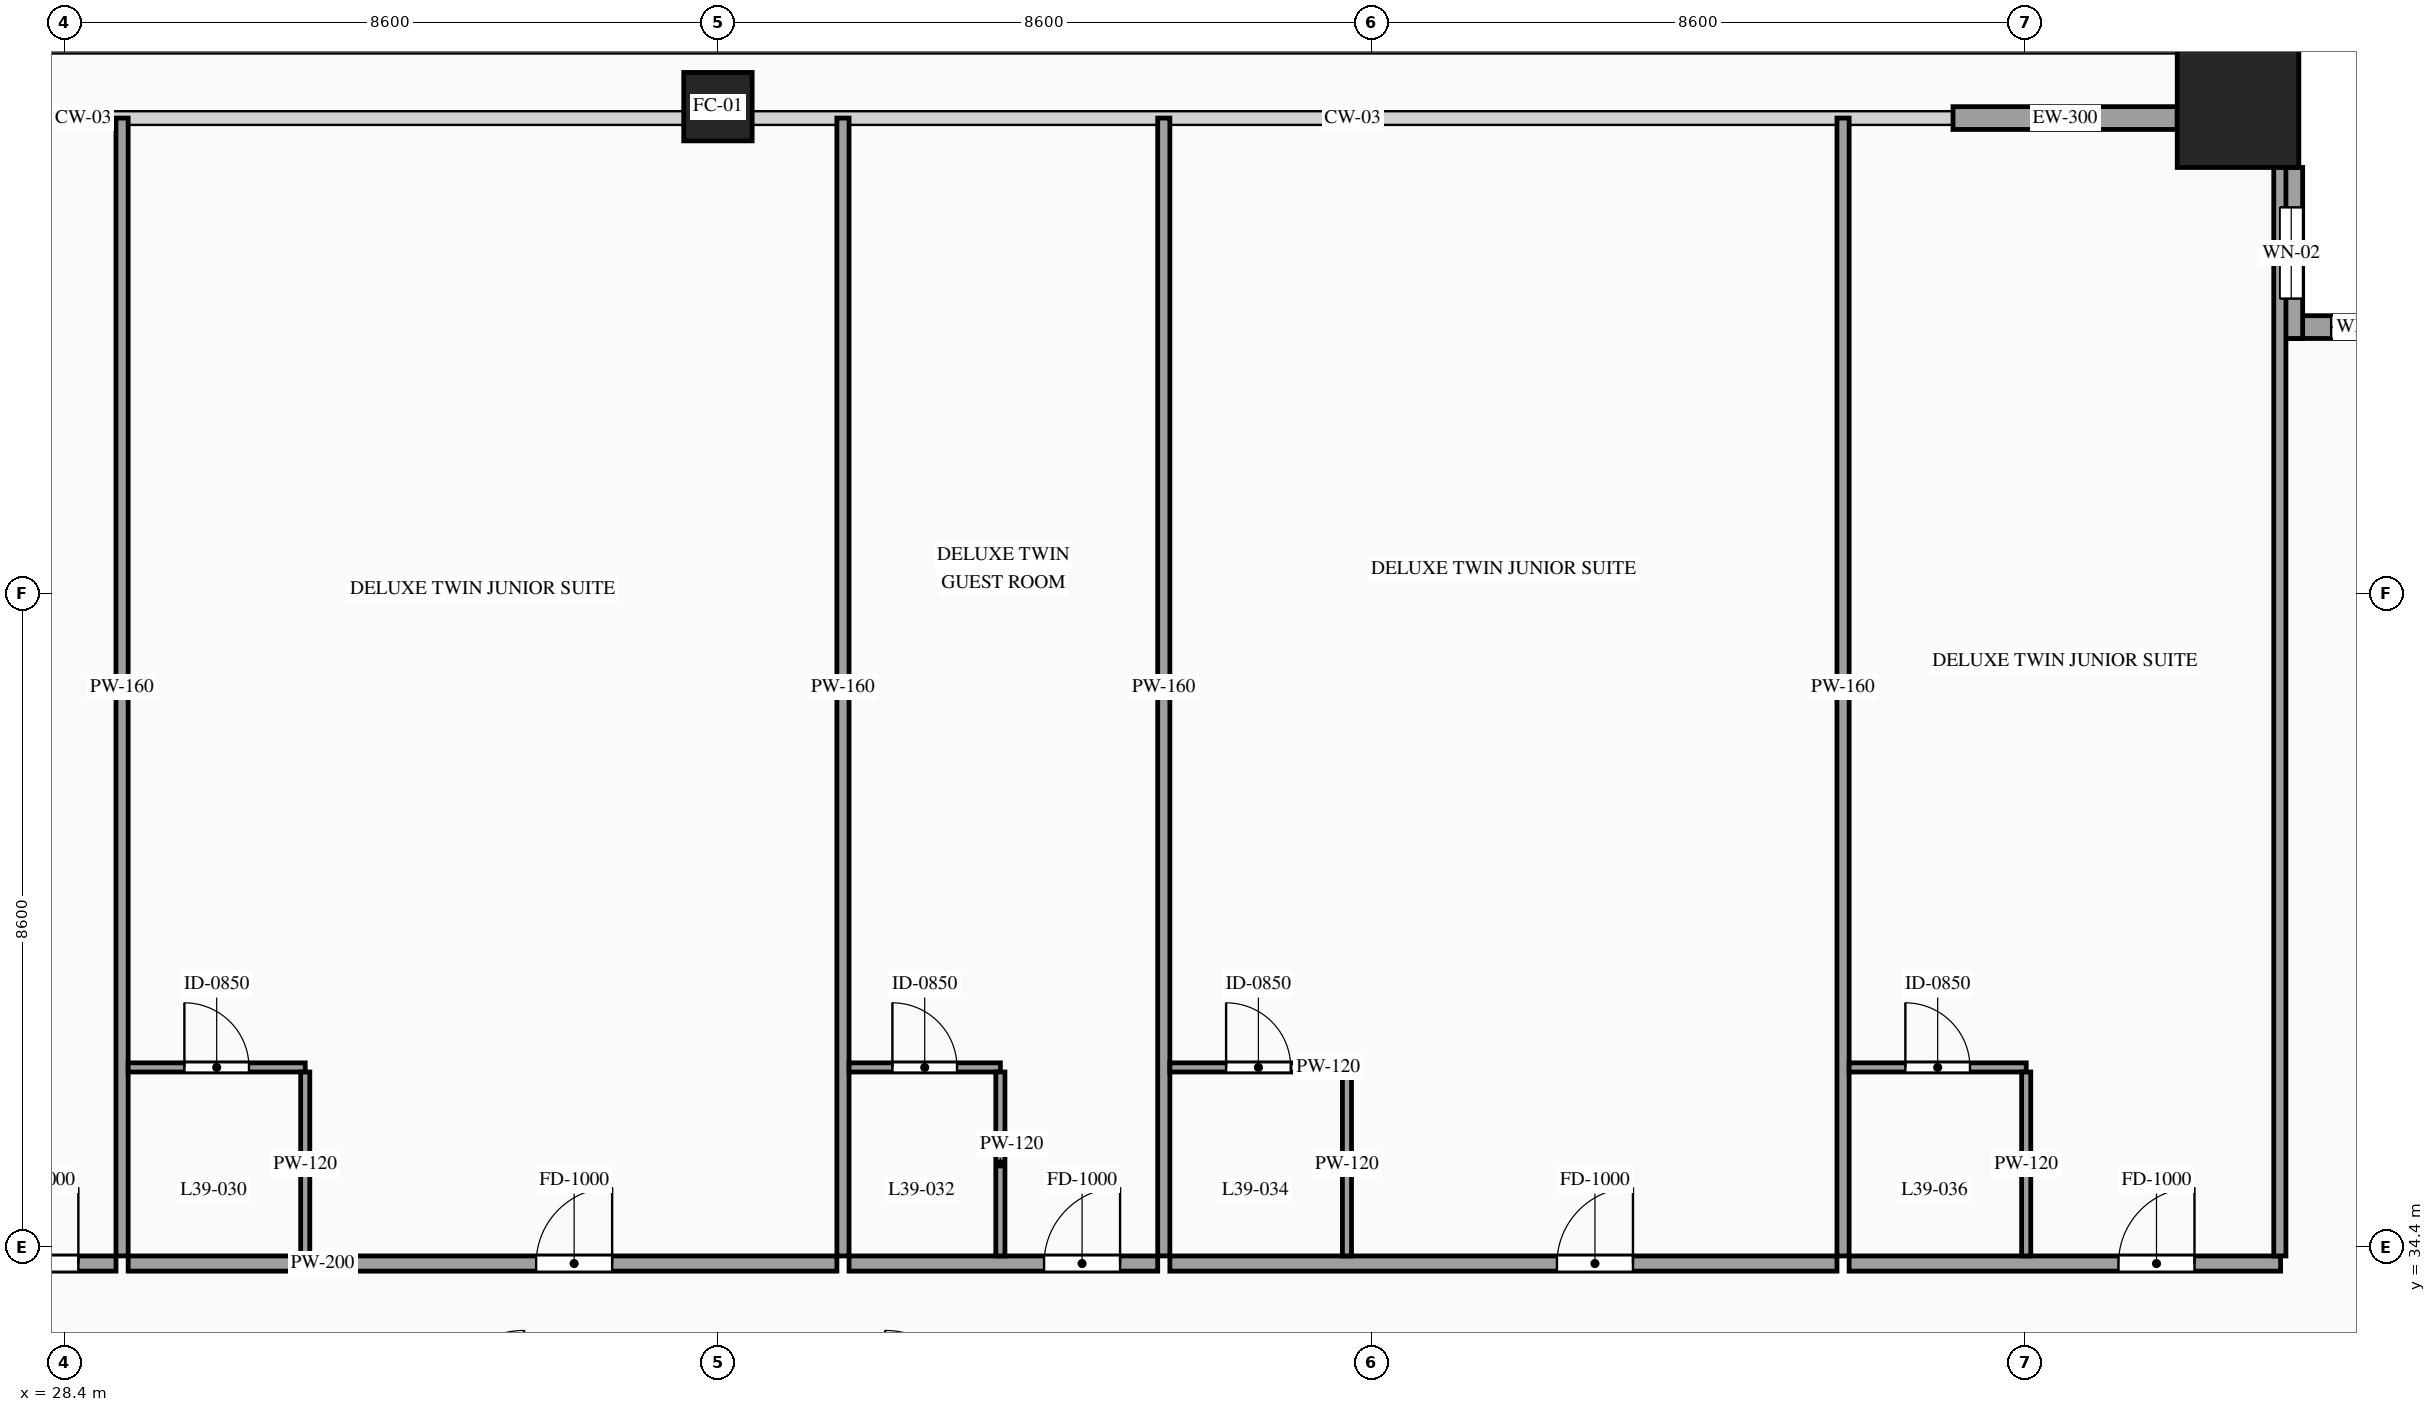
"""IFC4 building model, lengths in metres.
Left out: names, types, materials, properties, quantities, classifications, styles, units other than length and angle.
Written with IfcOpenShell. Run it as: python <this file> out.ifc"""

import sys

from ifc_helpers import new_model, si_unit, direction, frame, frame_2d, origin, origin_2d, place, context, subcontext, project, spatial, rectangle, hollow_rectangle, extrude, source, transform, mapped, element, fill, save


model = new_model("IFC4")
c1 = context("Model", 3, precision=1e-05, world=origin(), true_north=direction((0.0, 1.0)))
c2 = subcontext(c1, "Body", "Model", "MODEL_VIEW")
j1 = project(units=[si_unit("LENGTHUNIT", "METRE"), si_unit("PLANEANGLEUNIT", "RADIAN")], contexts=[c1])
p1 = place(None, origin())
s1 = spatial("IfcSite", under=j1, at=p1, CompositionType="ELEMENT")
p2 = place(p1, origin())
s2 = spatial("IfcBuilding", under=s1, at=p2, CompositionType="ELEMENT")
p3 = place(p2, frame((0.0, 0.0, 148.8)))
s3 = spatial("IfcBuildingStorey", under=s2, at=p3, CompositionType="ELEMENT", Elevation=148.8)
m1 = source(origin(), c2, "Body", "SweptSolid", [
    extrude(hollow_rectangle(XDim=0.9, YDim=0.9, WallThickness=0.042, at=origin_2d()), origin(), (0.0, 0.0, 1.0), 3.6),
])
p4 = place(p3, frame((37.0, 49.4, 0.0), z_axis=(0.0, 0.0, 1.0), x_axis=(1.0, 0.0, 0.0)))
e1 = element("IfcColumn", 1, at=p4, inside=s3, PredefinedType="COLUMN", context=c2, shape_type="MappedRepresentation", body=[
    mapped(m1, transform((0.0, 0.0, 0.0), scale=1.0)),
])
m2 = source(origin(), c2, "Body", "SweptSolid", [
    extrude(hollow_rectangle(XDim=1.6, YDim=1.6, WallThickness=0.07, at=origin_2d()), origin(), (0.0, 0.0, 1.0), 3.6),
])
p5 = place(p3, frame((57.0, 49.4, 0.0), z_axis=(0.0, 0.0, 1.0), x_axis=(1.0, 0.0, 0.0)))
e2 = element("IfcColumn", 2, at=p5, inside=s3, PredefinedType="COLUMN", context=c2, shape_type="MappedRepresentation", body=[
    mapped(m2, transform((0.0, 0.0, 0.0), scale=1.0)),
])
p6 = place(p3, frame((59.8, 46.5, 0.0), z_axis=(0.0, 0.0, 1.0), x_axis=(-1.0, 0.0, 0.0)))
e3 = element("IfcWall", 3, at=p6, inside=s3, PredefinedType="SOLIDWALL", context=c2, shape_type="SweptSolid", body=[
    extrude(rectangle(XDim=2.25, YDim=0.3, at=frame_2d((1.125, 0.0))), origin(), (0.0, 0.0, 1.0), 3.38),
])
p7 = place(p6, frame((0.675, 0.0, 0.85)))
e4 = element("IfcOpeningElement", 4, at=p7, cuts=e3, PredefinedType="OPENING", context=c2, shape_type="SweptSolid", body=[
    extrude(rectangle(XDim=0.9, YDim=1.5, at=frame_2d((0.45, 0.75))), frame((0.0, 0.165, 0.0), z_axis=(0.0, -1.0, 0.0), x_axis=(1.0, 0.0, 0.0)), (0.0, 0.0, 1.0), 0.33),
])
p8 = place(p3, frame((57.7, 46.35, 0.0), z_axis=(0.0, 0.0, 1.0), x_axis=(0.0, 1.0, 0.0)))
e5 = element("IfcWall", 5, at=p8, inside=s3, PredefinedType="SOLIDWALL", context=c2, shape_type="SweptSolid", body=[
    extrude(rectangle(XDim=2.25, YDim=0.3, at=frame_2d((1.125, 0.0))), origin(), (0.0, 0.0, 1.0), 3.38),
])
p9 = place(p8, frame((0.525, 0.0, 0.85)))
e6 = element("IfcOpeningElement", 6, at=p9, cuts=e5, PredefinedType="OPENING", context=c2, shape_type="SweptSolid", body=[
    extrude(rectangle(XDim=1.2, YDim=2.1, at=frame_2d((0.6, 1.05))), frame((0.0, 0.165, 0.0), z_axis=(0.0, -1.0, 0.0), x_axis=(1.0, 0.0, 0.0)), (0.0, 0.0, 1.0), 0.33),
])
m3 = source(origin(), c2, "Body", "SweptSolid", [
    extrude(rectangle(XDim=2.95, YDim=0.3, at=frame_2d((1.475, 0.0))), origin(), (0.0, 0.0, 1.0), 2.775),
])
p10 = place(p3, frame((53.25, 49.25, 0.0), z_axis=(0.0, 0.0, 1.0), x_axis=(1.0, 0.0, 0.0)))
e7 = element("IfcWall", 7, at=p10, inside=s3, PredefinedType="SOLIDWALL", context=c2, shape_type="MappedRepresentation", body=[
    mapped(m3, transform((0.0, 0.0, 0.0), scale=1.0)),
])
p11 = place(p3, frame((25.018, 34.18, 0.0), z_axis=(0.0, 0.0, 1.0), x_axis=(1.0, 0.0, 0.0)))
e8 = element("IfcWall", 8, at=p11, inside=s3, PredefinedType="PARTITIONING", context=c2, shape_type="SweptSolid", body=[
    extrude(rectangle(XDim=4.062, YDim=0.2, at=frame_2d((2.031, 0.0))), origin(), (0.0, 0.0, 1.0), 3.38),
])
p12 = place(p11, frame((2.567, 0.0, 0.0)))
e9 = element("IfcOpeningElement", 9, at=p12, cuts=e8, PredefinedType="OPENING", context=c2, shape_type="SweptSolid", body=[
    extrude(rectangle(XDim=1.0, YDim=2.2, at=frame_2d((0.5, 1.1))), frame((0.0, 0.115, 0.0), z_axis=(0.0, -1.0, 0.0), x_axis=(1.0, 0.0, 0.0)), (0.0, 0.0, 1.0), 0.23),
])
m4 = source(origin(), c2, "Body", "SweptSolid", [
    extrude(rectangle(XDim=14.97, YDim=0.16, at=frame_2d((7.485, 0.0))), origin(), (0.0, 0.0, 1.0), 3.38),
])
p13 = place(p3, frame((29.16, 34.28, 0.0), z_axis=(0.0, 0.0, 1.0), x_axis=(0.0, 1.0, 0.0)))
e10 = element("IfcWall", 10, at=p13, inside=s3, PredefinedType="PARTITIONING", context=c2, shape_type="MappedRepresentation", body=[
    mapped(m4, transform((0.0, 0.0, 0.0), scale=1.0)),
])
p14 = place(p3, frame((29.24, 34.18, 0.0), z_axis=(0.0, 0.0, 1.0), x_axis=(1.0, 0.0, 0.0)))
e11 = element("IfcWall", 11, at=p14, inside=s3, PredefinedType="PARTITIONING", context=c2, shape_type="SweptSolid", body=[
    extrude(rectangle(XDim=9.325, YDim=0.2, at=frame_2d((4.663, 0.0))), origin(), (0.0, 0.0, 1.0), 3.38),
])
p15 = place(p14, frame((5.368, 0.0, 0.0)))
e12 = element("IfcOpeningElement", 12, at=p15, cuts=e11, PredefinedType="OPENING", context=c2, shape_type="SweptSolid", body=[
    extrude(rectangle(XDim=1.0, YDim=2.2, at=frame_2d((0.5, 1.1))), frame((0.0, 0.115, 0.0), z_axis=(0.0, -1.0, 0.0), x_axis=(1.0, 0.0, 0.0)), (0.0, 0.0, 1.0), 0.23),
])
p16 = place(p3, frame((38.645, 34.28, 0.0), z_axis=(0.0, 0.0, 1.0), x_axis=(0.0, 1.0, 0.0)))
e13 = element("IfcWall", 13, at=p16, inside=s3, PredefinedType="PARTITIONING", context=c2, shape_type="MappedRepresentation", body=[
    mapped(m4, transform((0.0, 0.0, 0.0), scale=1.0)),
])
p17 = place(p3, frame((29.24, 36.76, 0.0), z_axis=(0.0, 0.0, 1.0), x_axis=(1.0, 0.0, 0.0)))
e14 = element("IfcWall", 14, at=p17, inside=s3, PredefinedType="PARTITIONING", context=c2, shape_type="SweptSolid", body=[
    extrude(rectangle(XDim=2.33, YDim=0.12, at=frame_2d((1.165, 0.0))), origin(), (0.0, 0.0, 1.0), 3.38),
])
p18 = place(p17, frame((0.74, 0.0, 0.0)))
e15 = element("IfcOpeningElement", 15, at=p18, cuts=e14, PredefinedType="OPENING", context=c2, shape_type="SweptSolid", body=[
    extrude(rectangle(XDim=0.85, YDim=2.1, at=frame_2d((0.425, 1.05))), frame((0.0, 0.075, 0.0), z_axis=(0.0, -1.0, 0.0), x_axis=(1.0, 0.0, 0.0)), (0.0, 0.0, 1.0), 0.15),
])
m5 = source(origin(), c2, "Body", "SweptSolid", [
    extrude(rectangle(XDim=2.42, YDim=0.12, at=frame_2d((1.21, 0.0))), origin(), (0.0, 0.0, 1.0), 3.38),
])
p19 = place(p3, frame((31.57, 34.28, 0.0), z_axis=(0.0, 0.0, 1.0), x_axis=(0.0, 1.0, 0.0)))
e16 = element("IfcWall", 16, at=p19, inside=s3, PredefinedType="PARTITIONING", context=c2, shape_type="MappedRepresentation", body=[
    mapped(m5, transform((0.0, 0.0, 0.0), scale=1.0)),
])
p20 = place(p3, frame((38.725, 34.18, 0.0), z_axis=(0.0, 0.0, 1.0), x_axis=(1.0, 0.0, 0.0)))
e17 = element("IfcWall", 17, at=p20, inside=s3, PredefinedType="PARTITIONING", context=c2, shape_type="SweptSolid", body=[
    extrude(rectangle(XDim=4.061, YDim=0.2, at=frame_2d((2.03, 0.0))), origin(), (0.0, 0.0, 1.0), 3.38),
])
p21 = place(p20, frame((2.566, 0.0, 0.0)))
e18 = element("IfcOpeningElement", 18, at=p21, cuts=e17, PredefinedType="OPENING", context=c2, shape_type="SweptSolid", body=[
    extrude(rectangle(XDim=1.0, YDim=2.2, at=frame_2d((0.5, 1.1))), frame((0.0, 0.115, 0.0), z_axis=(0.0, -1.0, 0.0), x_axis=(1.0, 0.0, 0.0)), (0.0, 0.0, 1.0), 0.23),
])
p22 = place(p3, frame((42.866, 34.28, 0.0), z_axis=(0.0, 0.0, 1.0), x_axis=(0.0, 1.0, 0.0)))
e19 = element("IfcWall", 19, at=p22, inside=s3, PredefinedType="PARTITIONING", context=c2, shape_type="MappedRepresentation", body=[
    mapped(m4, transform((0.0, 0.0, 0.0), scale=1.0)),
])
p23 = place(p3, frame((38.725, 36.76, 0.0), z_axis=(0.0, 0.0, 1.0), x_axis=(1.0, 0.0, 0.0)))
e20 = element("IfcWall", 20, at=p23, inside=s3, PredefinedType="PARTITIONING", context=c2, shape_type="SweptSolid", body=[
    extrude(rectangle(XDim=1.991, YDim=0.12, at=frame_2d((0.996, 0.0))), origin(), (0.0, 0.0, 1.0), 3.38),
])
p24 = place(p23, frame((0.571, 0.0, 0.0)))
e21 = element("IfcOpeningElement", 21, at=p24, cuts=e20, PredefinedType="OPENING", context=c2, shape_type="SweptSolid", body=[
    extrude(rectangle(XDim=0.85, YDim=2.1, at=frame_2d((0.425, 1.05))), frame((0.0, 0.075, 0.0), z_axis=(0.0, -1.0, 0.0), x_axis=(1.0, 0.0, 0.0)), (0.0, 0.0, 1.0), 0.15),
])
p25 = place(p3, frame((40.716, 34.28, 0.0), z_axis=(0.0, 0.0, 1.0), x_axis=(0.0, 1.0, 0.0)))
e22 = element("IfcWall", 22, at=p25, inside=s3, PredefinedType="PARTITIONING", context=c2, shape_type="MappedRepresentation", body=[
    mapped(m5, transform((0.0, 0.0, 0.0), scale=1.0)),
])
p26 = place(p3, frame((42.946, 34.18, 0.0), z_axis=(0.0, 0.0, 1.0), x_axis=(1.0, 0.0, 0.0)))
e23 = element("IfcWall", 23, at=p26, inside=s3, PredefinedType="PARTITIONING", context=c2, shape_type="SweptSolid", body=[
    extrude(rectangle(XDim=8.777, YDim=0.2, at=frame_2d((4.388, 0.0))), origin(), (0.0, 0.0, 1.0), 3.38),
])
p27 = place(p26, frame((5.093, 0.0, 0.0)))
e24 = element("IfcOpeningElement", 24, at=p27, cuts=e23, PredefinedType="OPENING", context=c2, shape_type="SweptSolid", body=[
    extrude(rectangle(XDim=1.0, YDim=2.2, at=frame_2d((0.5, 1.1))), frame((0.0, 0.115, 0.0), z_axis=(0.0, -1.0, 0.0), x_axis=(1.0, 0.0, 0.0)), (0.0, 0.0, 1.0), 0.23),
])
p28 = place(p3, frame((51.803, 34.28, 0.0), z_axis=(0.0, 0.0, 1.0), x_axis=(0.0, 1.0, 0.0)))
e25 = element("IfcWall", 25, at=p28, inside=s3, PredefinedType="PARTITIONING", context=c2, shape_type="MappedRepresentation", body=[
    mapped(m4, transform((0.0, 0.0, 0.0), scale=1.0)),
])
p29 = place(p3, frame((42.946, 36.76, 0.0), z_axis=(0.0, 0.0, 1.0), x_axis=(1.0, 0.0, 0.0)))
e26 = element("IfcWall", 26, at=p29, inside=s3, PredefinedType="PARTITIONING", context=c2, shape_type="SweptSolid", body=[
    extrude(rectangle(XDim=2.33, YDim=0.12, at=frame_2d((1.165, 0.0))), origin(), (0.0, 0.0, 1.0), 3.38),
])
p30 = place(p29, frame((0.74, 0.0, 0.0)))
e27 = element("IfcOpeningElement", 27, at=p30, cuts=e26, PredefinedType="OPENING", context=c2, shape_type="SweptSolid", body=[
    extrude(rectangle(XDim=0.85, YDim=2.1, at=frame_2d((0.425, 1.05))), frame((0.0, 0.075, 0.0), z_axis=(0.0, -1.0, 0.0), x_axis=(1.0, 0.0, 0.0)), (0.0, 0.0, 1.0), 0.15),
])
p31 = place(p3, frame((45.276, 34.28, 0.0), z_axis=(0.0, 0.0, 1.0), x_axis=(0.0, 1.0, 0.0)))
e28 = element("IfcWall", 28, at=p31, inside=s3, PredefinedType="PARTITIONING", context=c2, shape_type="MappedRepresentation", body=[
    mapped(m5, transform((0.0, 0.0, 0.0), scale=1.0)),
])
p32 = place(p3, frame((51.883, 34.18, 0.0), z_axis=(0.0, 0.0, 1.0), x_axis=(1.0, 0.0, 0.0)))
e29 = element("IfcWall", 29, at=p32, inside=s3, PredefinedType="PARTITIONING", context=c2, shape_type="SweptSolid", body=[
    extrude(rectangle(XDim=5.677, YDim=0.2, at=frame_2d((2.838, 0.0))), origin(), (0.0, 0.0, 1.0), 3.38),
])
p33 = place(p32, frame((3.544, 0.0, 0.0)))
e30 = element("IfcOpeningElement", 30, at=p33, cuts=e29, PredefinedType="OPENING", context=c2, shape_type="SweptSolid", body=[
    extrude(rectangle(XDim=1.0, YDim=2.2, at=frame_2d((0.5, 1.1))), frame((0.0, 0.115, 0.0), z_axis=(0.0, -1.0, 0.0), x_axis=(1.0, 0.0, 0.0)), (0.0, 0.0, 1.0), 0.23),
])
m6 = source(origin(), c2, "Body", "SweptSolid", [
    extrude(rectangle(XDim=14.82, YDim=0.16, at=frame_2d((7.41, 0.0))), origin(), (0.0, 0.0, 1.0), 3.38),
])
p34 = place(p3, frame((57.55, 34.28, 0.0), z_axis=(0.0, 0.0, 1.0), x_axis=(0.0, 1.0, 0.0)))
e31 = element("IfcWall", 31, at=p34, inside=s3, PredefinedType="PARTITIONING", context=c2, shape_type="MappedRepresentation", body=[
    mapped(m6, transform((0.0, 0.0, 0.0), scale=1.0)),
])
p35 = place(p3, frame((51.883, 36.76, 0.0), z_axis=(0.0, 0.0, 1.0), x_axis=(1.0, 0.0, 0.0)))
e32 = element("IfcWall", 32, at=p35, inside=s3, PredefinedType="PARTITIONING", context=c2, shape_type="SweptSolid", body=[
    extrude(rectangle(XDim=2.33, YDim=0.12, at=frame_2d((1.165, 0.0))), origin(), (0.0, 0.0, 1.0), 3.38),
])
p36 = place(p35, frame((0.74, 0.0, 0.0)))
e33 = element("IfcOpeningElement", 33, at=p36, cuts=e32, PredefinedType="OPENING", context=c2, shape_type="SweptSolid", body=[
    extrude(rectangle(XDim=0.85, YDim=2.1, at=frame_2d((0.425, 1.05))), frame((0.0, 0.075, 0.0), z_axis=(0.0, -1.0, 0.0), x_axis=(1.0, 0.0, 0.0)), (0.0, 0.0, 1.0), 0.15),
])
p37 = place(p3, frame((54.213, 34.28, 0.0), z_axis=(0.0, 0.0, 1.0), x_axis=(0.0, 1.0, 0.0)))
e34 = element("IfcWall", 34, at=p37, inside=s3, PredefinedType="PARTITIONING", context=c2, shape_type="MappedRepresentation", body=[
    mapped(m5, transform((0.0, 0.0, 0.0), scale=1.0)),
])
m7 = source(origin(), c2, "Body", "SweptSolid", [
    extrude(rectangle(XDim=0.9, YDim=1.5, at=frame_2d((0.45, 0.75))), frame((0.0, 0.03, 0.0), z_axis=(0.0, -1.0, 0.0), x_axis=(1.0, 0.0, 0.0)), (0.0, 0.0, 1.0), 0.06),
])
p38 = place(p7, origin())
e35 = element("IfcWindow", 35, at=p38, inside=s3, PartitioningType="SINGLE_PANEL", PredefinedType="WINDOW", context=c2, shape_type="MappedRepresentation", body=[
    mapped(m7, transform((0.0, 0.0, 0.0), scale=1.0)),
])
fill(e4, e35)
m8 = source(origin(), c2, "Body", "SweptSolid", [
    extrude(rectangle(XDim=1.2, YDim=2.1, at=frame_2d((0.6, 1.05))), frame((0.0, 0.03, 0.0), z_axis=(0.0, -1.0, 0.0), x_axis=(1.0, 0.0, 0.0)), (0.0, 0.0, 1.0), 0.06),
])
p39 = place(p9, origin())
e36 = element("IfcWindow", 36, at=p39, inside=s3, PartitioningType="SINGLE_PANEL", PredefinedType="WINDOW", context=c2, shape_type="MappedRepresentation", body=[
    mapped(m8, transform((0.0, 0.0, 0.0), scale=1.0)),
])
fill(e6, e36)
m9 = source(origin(), c2, "Body", "SweptSolid", [
    extrude(rectangle(XDim=1.0, YDim=2.2, at=frame_2d((0.5, 1.1))), frame((0.0, 0.025, 0.0), z_axis=(0.0, -1.0, 0.0), x_axis=(1.0, 0.0, 0.0)), (0.0, 0.0, 1.0), 0.05),
])
p40 = place(p12, origin())
e37 = element("IfcDoor", 37, at=p40, inside=s3, OperationType="SINGLE_SWING_RIGHT", PredefinedType="DOOR", context=c2, shape_type="MappedRepresentation", body=[
    mapped(m9, transform((0.0, 0.0, 0.0), scale=1.0)),
])
fill(e9, e37)
p41 = place(p15, origin())
e38 = element("IfcDoor", 38, at=p41, inside=s3, OperationType="SINGLE_SWING_RIGHT", PredefinedType="DOOR", context=c2, shape_type="MappedRepresentation", body=[
    mapped(m9, transform((0.0, 0.0, 0.0), scale=1.0)),
])
fill(e12, e38)
m10 = source(origin(), c2, "Body", "SweptSolid", [
    extrude(rectangle(XDim=0.85, YDim=2.1, at=frame_2d((0.425, 1.05))), frame((0.0, 0.025, 0.0), z_axis=(0.0, -1.0, 0.0), x_axis=(1.0, 0.0, 0.0)), (0.0, 0.0, 1.0), 0.05),
])
p42 = place(p18, origin())
e39 = element("IfcDoor", 39, at=p42, inside=s3, OperationType="SINGLE_SWING_LEFT", PredefinedType="DOOR", context=c2, shape_type="MappedRepresentation", body=[
    mapped(m10, transform((0.0, 0.0, 0.0), scale=1.0)),
])
fill(e15, e39)
p43 = place(p21, origin())
e40 = element("IfcDoor", 40, at=p43, inside=s3, OperationType="SINGLE_SWING_RIGHT", PredefinedType="DOOR", context=c2, shape_type="MappedRepresentation", body=[
    mapped(m9, transform((0.0, 0.0, 0.0), scale=1.0)),
])
fill(e18, e40)
p44 = place(p24, origin())
e41 = element("IfcDoor", 41, at=p44, inside=s3, OperationType="SINGLE_SWING_LEFT", PredefinedType="DOOR", context=c2, shape_type="MappedRepresentation", body=[
    mapped(m10, transform((0.0, 0.0, 0.0), scale=1.0)),
])
fill(e21, e41)
p45 = place(p27, origin())
e42 = element("IfcDoor", 42, at=p45, inside=s3, OperationType="SINGLE_SWING_RIGHT", PredefinedType="DOOR", context=c2, shape_type="MappedRepresentation", body=[
    mapped(m9, transform((0.0, 0.0, 0.0), scale=1.0)),
])
fill(e24, e42)
p46 = place(p30, origin())
e43 = element("IfcDoor", 43, at=p46, inside=s3, OperationType="SINGLE_SWING_LEFT", PredefinedType="DOOR", context=c2, shape_type="MappedRepresentation", body=[
    mapped(m10, transform((0.0, 0.0, 0.0), scale=1.0)),
])
fill(e27, e43)
p47 = place(p33, origin())
e44 = element("IfcDoor", 44, at=p47, inside=s3, OperationType="SINGLE_SWING_RIGHT", PredefinedType="DOOR", context=c2, shape_type="MappedRepresentation", body=[
    mapped(m9, transform((0.0, 0.0, 0.0), scale=1.0)),
])
fill(e30, e44)
p48 = place(p36, origin())
e45 = element("IfcDoor", 45, at=p48, inside=s3, OperationType="SINGLE_SWING_LEFT", PredefinedType="DOOR", context=c2, shape_type="MappedRepresentation", body=[
    mapped(m10, transform((0.0, 0.0, 0.0), scale=1.0)),
])
fill(e33, e45)
save(model, sys.argv[1])
